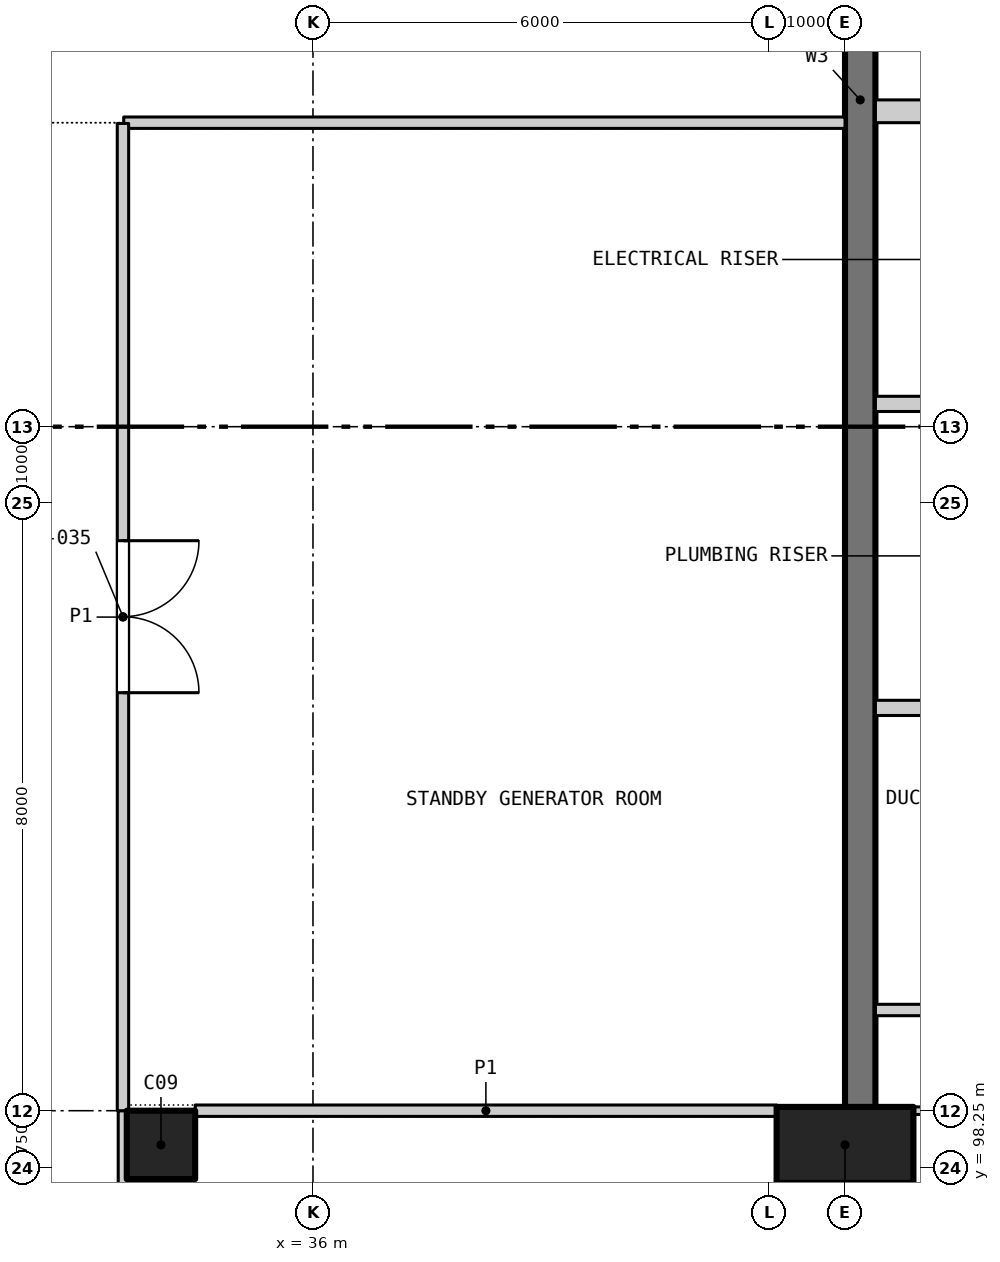
"""IFC4 building model, lengths in metres.
Left out: names, types, materials, properties, quantities, classifications, styles, units other than length and angle.
Written with IfcOpenShell. Run it as: python <this file> out.ifc"""

import sys

from ifc_helpers import new_model, si_unit, direction, frame, frame_2d, origin, origin_2d, place, context, subcontext, project, spatial, rectangle, extrude, element, fill, save


model = new_model("IFC4")
c1 = context("Model", 3, precision=1e-05, world=origin(), true_north=direction((0.0, 1.0)))
c2 = subcontext(c1, "Body", "Model", "MODEL_VIEW")
j1 = project(units=[si_unit("LENGTHUNIT", "METRE"), si_unit("PLANEANGLEUNIT", "RADIAN")], contexts=[c1])
p1 = place(None, origin())
s1 = spatial("IfcSite", under=j1, at=p1, CompositionType="ELEMENT")
p2 = place(p1, origin())
s2 = spatial("IfcBuilding", under=s1, at=p2, CompositionType="ELEMENT")
p3 = place(p2, frame((0.0, 0.0, -10.0)))
s3 = spatial("IfcBuildingStorey", under=s2, at=p3, CompositionType="ELEMENT", Elevation=-10.0)
p4 = place(p3, frame((34.0, 98.55, -1.4), z_axis=(0.0, 0.0, 1.0), x_axis=(1.0, 0.0, 0.0)))
e1 = element("IfcColumn", 1, at=p4, inside=s3, PredefinedType="COLUMN", context=c2, shape_type="SweptSolid", body=[
    extrude(rectangle(XDim=0.9, YDim=0.9, at=origin_2d()), origin(), (0.0, 0.0, 1.0), 6.4),
])
p5 = place(p3, frame((43.2, 99.0, -1.4), z_axis=(0.0, 0.0, 1.0), x_axis=(0.0, 1.0, 0.0)))
e2 = element("IfcWall", 2, at=p5, inside=s3, PredefinedType="SHEAR", context=c2, shape_type="SweptSolid", body=[
    extrude(rectangle(XDim=26.6, YDim=0.4, at=frame_2d((13.3, 0.0))), origin(), (0.0, 0.0, 1.0), 6.4),
])
p6 = place(p5, frame((13.95, 0.0, 1.4)))
e3 = element("IfcOpeningElement", 3, at=p6, cuts=e2, PredefinedType="OPENING", context=c2, shape_type="SweptSolid", body=[
    extrude(rectangle(XDim=1.4, YDim=2.4, at=frame_2d((0.7, 1.2))), frame((0.0, 0.21, 0.0), z_axis=(0.0, -1.0, 0.0), x_axis=(1.0, 0.0, 0.0)), (0.0, 0.0, 1.0), 0.42),
])
p7 = place(p3, frame((43.0, 98.55, -1.4), z_axis=(0.0, 0.0, 1.0), x_axis=(1.0, 0.0, 0.0)))
e4 = element("IfcColumn", 4, at=p7, inside=s3, PredefinedType="COLUMN", context=c2, shape_type="SweptSolid", body=[
    extrude(rectangle(XDim=1.8, YDim=1.0, at=origin_2d()), origin(), (0.0, 0.0, 1.0), 6.4),
])
p8 = place(p3, frame((43.4, 100.325, 0.0), z_axis=(0.0, 0.0, 1.0), x_axis=(1.0, 0.0, 0.0)))
e5 = element("IfcWall", 5, at=p8, inside=s3, PredefinedType="PARTITIONING", context=c2, shape_type="SweptSolid", body=[
    extrude(rectangle(XDim=1.95, YDim=0.15, at=frame_2d((0.975, 0.0))), origin(), (0.0, 0.0, 1.0), 4.75),
])
for number, where, z_axis, x_axis in (
    (6, (43.4, 104.3, 0.0), (0.0, 0.0, 1.0), (1.0, 0.0, 0.0)),
    (7, (43.4, 108.3, 0.0), (0.0, 0.0, 1.0), (1.0, 0.0, 0.0)),
):
    element("IfcWall", number, at=place(p3, frame(where, z_axis=z_axis, x_axis=x_axis)), inside=s3, PredefinedType="PARTITIONING", context=c2, shape_type="SweptSolid", body=[
        extrude(rectangle(XDim=1.95, YDim=0.2, at=frame_2d((0.975, 0.0))), origin(), (0.0, 0.0, 1.0), 4.75),
    ])
p9 = place(p3, frame((43.4, 112.15, 0.0), z_axis=(0.0, 0.0, 1.0), x_axis=(1.0, 0.0, 0.0)))
e8 = element("IfcWall", 8, at=p9, inside=s3, PredefinedType="PARTITIONING", context=c2, shape_type="SweptSolid", body=[
    extrude(rectangle(XDim=1.95, YDim=0.3, at=frame_2d((0.975, 0.0))), origin(), (0.0, 0.0, 1.0), 4.75),
])
p10 = place(p3, frame((34.45, 99.0, 0.0), z_axis=(0.0, 0.0, 1.0), x_axis=(1.0, 0.0, 0.0)))
e9 = element("IfcWall", 9, at=p10, inside=s3, PredefinedType="PARTITIONING", context=c2, shape_type="SweptSolid", body=[
    extrude(rectangle(XDim=7.65, YDim=0.15, at=frame_2d((3.825, 0.0))), origin(), (0.0, 0.0, 1.0), 4.75),
])
p11 = place(p3, frame((43.9, 99.0, 0.0), z_axis=(0.0, 0.0, 1.0), x_axis=(1.0, 0.0, 0.0)))
e10 = element("IfcWall", 10, at=p11, inside=s3, PredefinedType="PARTITIONING", context=c2, shape_type="SweptSolid", body=[
    extrude(rectangle(XDim=1.388, YDim=0.1, at=frame_2d((0.694, 0.0))), origin(), (0.0, 0.0, 1.0), 4.75),
])
p12 = place(p3, frame((33.51, 112.0, 0.0), z_axis=(0.0, 0.0, 1.0), x_axis=(1.0, 0.0, 0.0)))
e11 = element("IfcWall", 11, at=p12, inside=s3, PredefinedType="PARTITIONING", context=c2, shape_type="SweptSolid", body=[
    extrude(rectangle(XDim=9.49, YDim=0.15, at=frame_2d((4.745, 0.0))), origin(), (0.0, 0.0, 1.0), 4.75),
])
p13 = place(p3, frame((33.5, 85.5, 0.0), z_axis=(0.0, 0.0, 1.0), x_axis=(0.0, 1.0, 0.0)))
e12 = element("IfcWall", 12, at=p13, inside=s3, PredefinedType="PARTITIONING", context=c2, shape_type="SweptSolid", body=[
    extrude(rectangle(XDim=13.5, YDim=0.125, at=frame_2d((6.75, 0.0))), origin(), (0.0, 0.0, 1.0), 4.75),
])
p14 = place(p13, frame((6.15, 0.0, 0.0)))
e13 = element("IfcOpeningElement", 13, at=p14, cuts=e12, PredefinedType="OPENING", context=c2, shape_type="SweptSolid", body=[
    extrude(rectangle(XDim=1.2, YDim=2.1, at=frame_2d((0.6, 1.05))), frame((0.0, 0.073, 0.0), z_axis=(0.0, -1.0, 0.0), x_axis=(1.0, 0.0, 0.0)), (0.0, 0.0, 1.0), 0.145),
])
p15 = place(p3, frame((33.5, 99.0, 0.0), z_axis=(0.0, 0.0, 1.0), x_axis=(0.0, 1.0, 0.0)))
e14 = element("IfcWall", 14, at=p15, inside=s3, PredefinedType="PARTITIONING", context=c2, shape_type="SweptSolid", body=[
    extrude(rectangle(XDim=12.99, YDim=0.15, at=frame_2d((6.495, 0.0))), origin(), (0.0, 0.0, 1.0), 4.75),
])
p16 = place(p15, frame((5.5, 0.0, 0.0)))
e15 = element("IfcOpeningElement", 15, at=p16, cuts=e14, PredefinedType="OPENING", context=c2, shape_type="SweptSolid", body=[
    extrude(rectangle(XDim=2.0, YDim=2.4, at=frame_2d((1.0, 1.2))), frame((0.0, 0.085, 0.0), z_axis=(0.0, -1.0, 0.0), x_axis=(1.0, 0.0, 0.0)), (0.0, 0.0, 1.0), 0.17),
])
p17 = place(p16, frame((2.0, 0.0, 0.0), z_axis=(0.0, 0.0, 1.0), x_axis=(-1.0, 0.0, 0.0)))
e16 = element("IfcDoor", 16, at=p17, inside=s3, OperationType="DOUBLE_DOOR_SINGLE_SWING", PredefinedType="DOOR", context=c2, shape_type="SweptSolid", body=[
    extrude(rectangle(XDim=2.0, YDim=2.4, at=frame_2d((1.0, 1.2))), frame((0.0, 0.025, 0.0), z_axis=(0.0, -1.0, 0.0), x_axis=(1.0, 0.0, 0.0)), (0.0, 0.0, 1.0), 0.05),
])
fill(e15, e16)
save(model, sys.argv[1])
